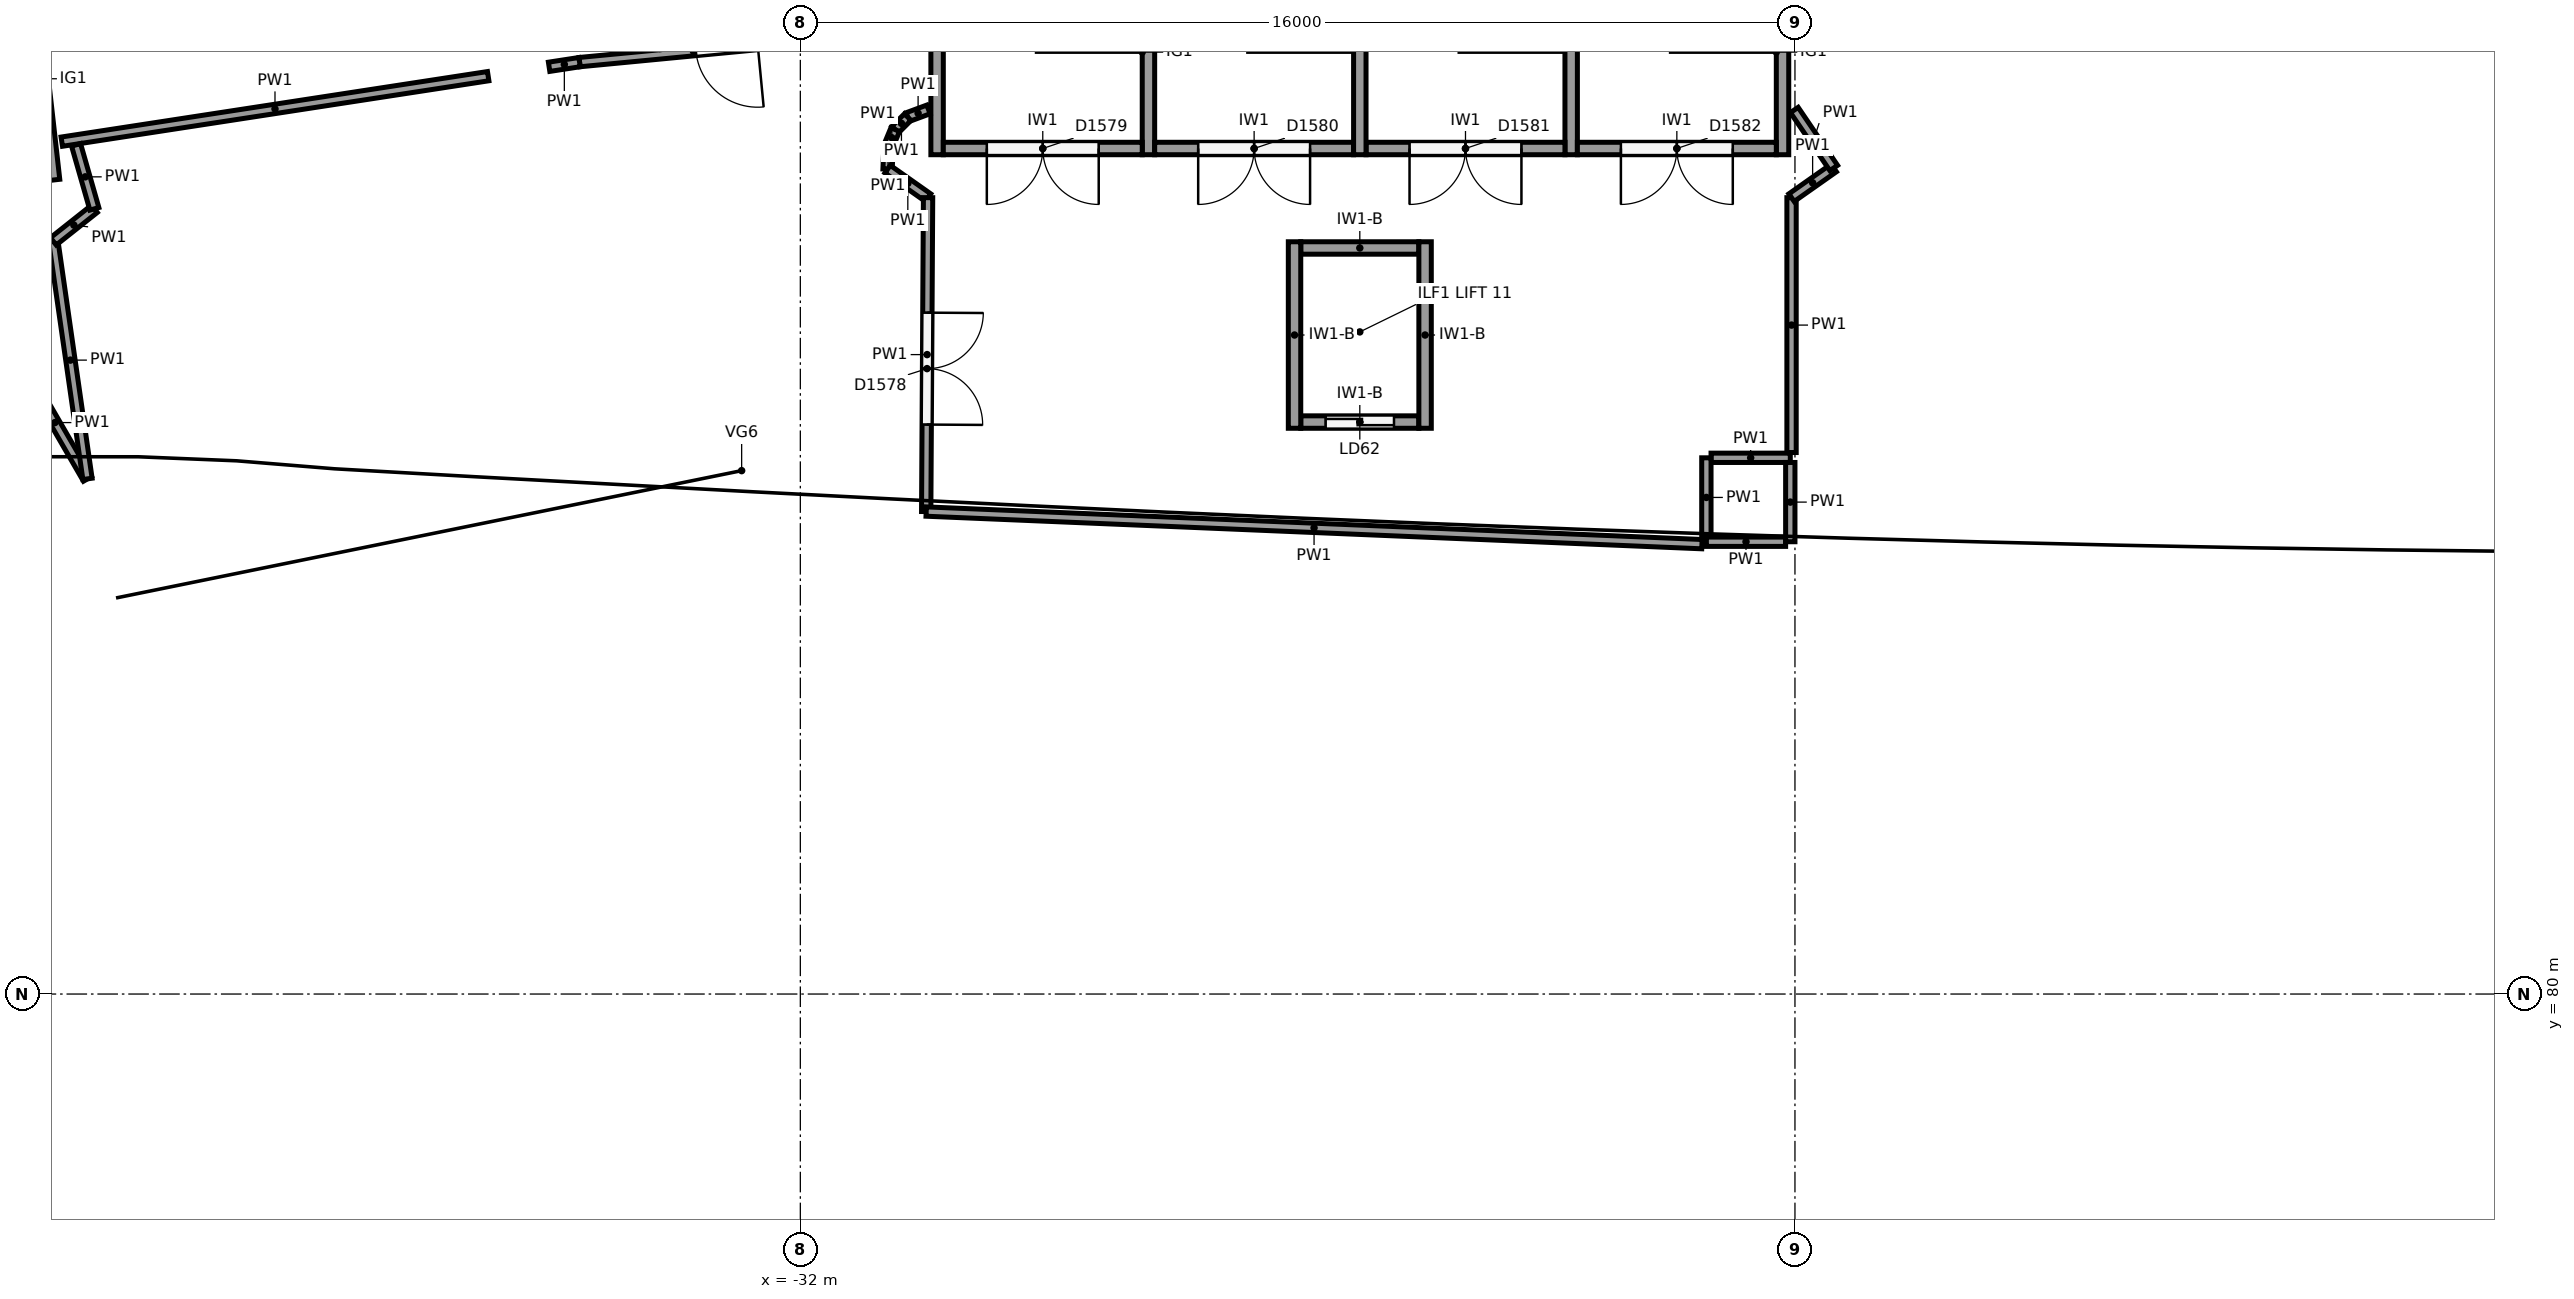
"""IFC4 building model, lengths in metres.
Left out: names, types, materials, properties, quantities, classifications, styles, units other than length and angle.
Written with IfcOpenShell. Run it as: python <this file> out.ifc"""

import sys

from ifc_helpers import new_model, si_unit, direction, frame, frame_2d, origin, origin_2d, place, context, subcontext, project, spatial, rectangle, circle, extrude, element, fill, save


model = new_model("IFC4")
c1 = context("Model", 3, precision=1e-05, world=origin(), true_north=direction((0.0, 1.0)))
c2 = subcontext(c1, "Body", "Model", "MODEL_VIEW")
j1 = project(units=[si_unit("LENGTHUNIT", "METRE"), si_unit("PLANEANGLEUNIT", "RADIAN")], contexts=[c1])
p1 = place(None, origin())
s1 = spatial("IfcSite", under=j1, at=p1, CompositionType="ELEMENT")
p2 = place(p1, origin())
s2 = spatial("IfcBuilding", under=s1, at=p2, CompositionType="ELEMENT")
p3 = place(p2, frame((0.0, 0.0, 24.0)))
s3 = spatial("IfcBuildingStorey", under=s2, at=p3, CompositionType="ELEMENT", Elevation=24.0)
p4 = place(p3, frame((-6.871, 89.518, 0.0), z_axis=(0.0, 0.0, 1.0), x_axis=(1.0, 0.0, 0.0)))
e1 = element("IfcColumn", 1, at=p4, inside=s3, PredefinedType="COLUMN", context=c2, shape_type="SweptSolid", body=[
    extrude(circle(Radius=0.45, at=origin_2d()), origin(), (0.0, 0.0, 1.0), 4.8),
])
p5 = place(p3, frame((-19.627, 89.904, 0.0), z_axis=(0.0, 0.0, 1.0), x_axis=(1.0, 0.0, 0.0)))
e2 = element("IfcColumn", 2, at=p5, inside=s3, PredefinedType="COLUMN", context=c2, shape_type="SweptSolid", body=[
    extrude(circle(Radius=0.55, at=origin_2d()), origin(), (0.0, 0.0, 1.0), 6.0),
])
p6 = place(p3, frame((-34.531, 89.912, 0.0), z_axis=(0.0, 0.0, 1.0), x_axis=(1.0, 0.0, 0.0)))
e3 = element("IfcColumn", 3, at=p6, inside=s3, PredefinedType="COLUMN", context=c2, shape_type="SweptSolid", body=[
    extrude(circle(Radius=0.45, at=origin_2d()), origin(), (0.0, 0.0, 1.0), 3.9),
])
for number, where, z_axis, x_axis in (
    (4, (-16.2, 102.3, 0.0), (0.0, 0.0, 1.0), (0.0, -1.0, 0.0)),
    (5, (-23.0, 102.3, 0.0), (0.0, 0.0, 1.0), (0.0, -1.0, 0.0)),
    (6, (-29.8, 102.3, 0.0), (0.0, 0.0, 1.0), (0.0, -1.0, 0.0)),
    (7, (-19.6, 102.3, 0.0), (0.0, 0.0, 1.0), (0.0, -1.0, 0.0)),
    (8, (-26.4, 102.3, 0.0), (0.0, 0.0, 1.0), (0.0, -1.0, 0.0)),
):
    element("IfcWall", number, at=place(p3, frame(where, z_axis=z_axis, x_axis=x_axis)), inside=s3, PredefinedType="SHEAR", context=c2, shape_type="SweptSolid", body=[
        extrude(rectangle(XDim=8.8, YDim=0.2, at=frame_2d((4.4, 0.0))), origin(), (0.0, 0.0, 1.0), 5.75),
    ])
p7 = place(p3, frame((-16.3, 93.6, 0.0), z_axis=(0.0, 0.0, 1.0), x_axis=(-1.0, 0.0, 0.0)))
e9 = element("IfcWall", 9, at=p7, inside=s3, PredefinedType="SHEAR", context=c2, shape_type="SweptSolid", body=[
    extrude(rectangle(XDim=3.2, YDim=0.2, at=frame_2d((1.6, 0.0))), origin(), (0.0, 0.0, 1.0), 5.75),
])
p8 = place(p7, frame((0.7, 0.0, 0.0)))
e10 = element("IfcOpeningElement", 10, at=p8, cuts=e9, PredefinedType="OPENING", context=c2, shape_type="SweptSolid", body=[
    extrude(rectangle(XDim=1.8, YDim=2.1, at=frame_2d((0.9, 1.05))), frame((0.0, 0.11, 0.0), z_axis=(0.0, -1.0, 0.0), x_axis=(1.0, 0.0, 0.0)), (0.0, 0.0, 1.0), 0.22),
])
p9 = place(p3, frame((-19.7, 93.6, 0.0), z_axis=(0.0, 0.0, 1.0), x_axis=(-1.0, 0.0, 0.0)))
e11 = element("IfcWall", 11, at=p9, inside=s3, PredefinedType="SHEAR", context=c2, shape_type="SweptSolid", body=[
    extrude(rectangle(XDim=3.2, YDim=0.2, at=frame_2d((1.6, 0.0))), origin(), (0.0, 0.0, 1.0), 5.75),
])
p10 = place(p9, frame((0.7, 0.0, 0.0)))
e12 = element("IfcOpeningElement", 12, at=p10, cuts=e11, PredefinedType="OPENING", context=c2, shape_type="SweptSolid", body=[
    extrude(rectangle(XDim=1.8, YDim=2.1, at=frame_2d((0.9, 1.05))), frame((0.0, 0.11, 0.0), z_axis=(0.0, -1.0, 0.0), x_axis=(1.0, 0.0, 0.0)), (0.0, 0.0, 1.0), 0.22),
])
p11 = place(p3, frame((-23.1, 93.6, 0.0), z_axis=(0.0, 0.0, 1.0), x_axis=(-1.0, 0.0, 0.0)))
e13 = element("IfcWall", 13, at=p11, inside=s3, PredefinedType="SHEAR", context=c2, shape_type="SweptSolid", body=[
    extrude(rectangle(XDim=3.2, YDim=0.2, at=frame_2d((1.6, 0.0))), origin(), (0.0, 0.0, 1.0), 5.75),
])
p12 = place(p11, frame((0.7, 0.0, 0.0)))
e14 = element("IfcOpeningElement", 14, at=p12, cuts=e13, PredefinedType="OPENING", context=c2, shape_type="SweptSolid", body=[
    extrude(rectangle(XDim=1.8, YDim=2.1, at=frame_2d((0.9, 1.05))), frame((0.0, 0.11, 0.0), z_axis=(0.0, -1.0, 0.0), x_axis=(1.0, 0.0, 0.0)), (0.0, 0.0, 1.0), 0.22),
])
p13 = place(p3, frame((-26.5, 93.6, 0.0), z_axis=(0.0, 0.0, 1.0), x_axis=(-1.0, 0.0, 0.0)))
e15 = element("IfcWall", 15, at=p13, inside=s3, PredefinedType="SHEAR", context=c2, shape_type="SweptSolid", body=[
    extrude(rectangle(XDim=3.2, YDim=0.2, at=frame_2d((1.6, 0.0))), origin(), (0.0, 0.0, 1.0), 5.75),
])
p14 = place(p13, frame((0.7, 0.0, 0.0)))
e16 = element("IfcOpeningElement", 16, at=p14, cuts=e15, PredefinedType="OPENING", context=c2, shape_type="SweptSolid", body=[
    extrude(rectangle(XDim=1.8, YDim=2.1, at=frame_2d((0.9, 1.05))), frame((0.0, 0.11, 0.0), z_axis=(0.0, -1.0, 0.0), x_axis=(1.0, 0.0, 0.0)), (0.0, 0.0, 1.0), 0.22),
])
for number, where, z_axis, x_axis in (
    (17, (-21.95, 92.1, 0.0), (0.0, 0.0, 1.0), (0.0, -1.0, 0.0)),
    (18, (-24.05, 92.1, 0.0), (0.0, 0.0, 1.0), (0.0, -1.0, 0.0)),
):
    element("IfcWall", number, at=place(p3, frame(where, z_axis=z_axis, x_axis=x_axis)), inside=s3, PredefinedType="SHEAR", context=c2, shape_type="SweptSolid", body=[
        extrude(rectangle(XDim=3.0, YDim=0.2, at=frame_2d((1.5, 0.0))), origin(), (0.0, 0.0, 1.0), 4.6),
    ])
p15 = place(p3, frame((-22.05, 92.0, 0.0), z_axis=(0.0, 0.0, 1.0), x_axis=(-1.0, 0.0, 0.0)))
e19 = element("IfcWall", 19, at=p15, inside=s3, PredefinedType="SHEAR", context=c2, shape_type="SweptSolid", body=[
    extrude(rectangle(XDim=1.9, YDim=0.2, at=frame_2d((0.95, 0.0))), origin(), (0.0, 0.0, 1.0), 4.6),
])
p16 = place(p3, frame((-22.05, 89.2, 0.0), z_axis=(0.0, 0.0, 1.0), x_axis=(-1.0, 0.0, 0.0)))
e20 = element("IfcWall", 20, at=p16, inside=s3, PredefinedType="SHEAR", context=c2, shape_type="SweptSolid", body=[
    extrude(rectangle(XDim=1.9, YDim=0.2, at=frame_2d((0.95, 0.0))), origin(), (0.0, 0.0, 1.0), 4.6),
])
p17 = place(p16, frame((0.4, 0.0, 0.0)))
e21 = element("IfcOpeningElement", 21, at=p17, cuts=e20, PredefinedType="OPENING", context=c2, shape_type="SweptSolid", body=[
    extrude(rectangle(XDim=1.1, YDim=2.1, at=frame_2d((0.55, 1.05))), frame((0.0, 0.11, 0.0), z_axis=(0.0, -1.0, 0.0), x_axis=(1.0, 0.0, 0.0)), (0.0, 0.0, 1.0), 0.22),
])
p18 = place(p3, frame((-44.863, 100.646, 0.0), z_axis=(0.0, 0.0, 1.0), x_axis=(0.111951003472, -0.993713727802, 0.0)))
e22 = element("IfcWall", 22, at=p18, inside=s3, PredefinedType="SHEAR", context=c2, shape_type="SweptSolid", body=[
    extrude(rectangle(XDim=7.6, YDim=0.2, at=frame_2d((3.8, 0.0))), origin(), (0.0, 0.0, 1.0), 5.75),
])
p19 = place(p3, frame((-31.889, 95.34, 0.0), z_axis=(0.0, 0.0, 1.0), x_axis=(-0.995436828667, -0.095422849118, 0.0)))
e23 = element("IfcWall", 23, at=p19, inside=s3, PredefinedType="PARTITIONING", context=c2, shape_type="SweptSolid", body=[
    extrude(rectangle(XDim=3.679, YDim=0.15, at=frame_2d((1.84, 0.0))), origin(), (0.0, 0.0, 1.0), 5.4),
])
p20 = place(p19, frame((0.8, 0.0, 0.0)))
e24 = element("IfcOpeningElement", 24, at=p20, cuts=e23, PredefinedType="OPENING", context=c2, shape_type="SweptSolid", body=[
    extrude(rectangle(XDim=1.0, YDim=2.1, at=frame_2d((0.5, 1.05))), frame((0.0, 0.085, 0.0), z_axis=(0.0, -1.0, 0.0), x_axis=(1.0, 0.0, 0.0)), (0.0, 0.0, 1.0), 0.17),
])
p21 = place(p3, frame((-35.551, 94.989, 0.0), z_axis=(0.0, 0.0, 1.0), x_axis=(-0.988428563691, -0.151687093979, 0.0)))
e25 = element("IfcWall", 25, at=p21, inside=s3, PredefinedType="PARTITIONING", context=c2, shape_type="SweptSolid", body=[
    extrude(rectangle(XDim=0.496, YDim=0.15, at=frame_2d((0.248, 0.0))), origin(), (0.0, 0.0, 1.0), 5.4),
])
p22 = place(p3, frame((-37.021, 94.763, 0.0), z_axis=(0.0, 0.0, 1.0), x_axis=(-0.988411114545, -0.151800753106, 0.0)))
e26 = element("IfcWall", 26, at=p22, inside=s3, PredefinedType="PARTITIONING", context=c2, shape_type="SweptSolid", body=[
    extrude(rectangle(XDim=6.94, YDim=0.15, at=frame_2d((3.47, 0.0))), origin(), (0.0, 0.0, 1.0), 5.4),
])
p23 = place(p3, frame((-16.075, 88.625, 0.0), z_axis=(0.0, 0.0, 1.0), x_axis=(-1.0, 0.0, 0.0)))
e27 = element("IfcWall", 27, at=p23, inside=s3, PredefinedType="PARTITIONING", context=c2, shape_type="SweptSolid", body=[
    extrude(rectangle(XDim=1.275, YDim=0.15, at=frame_2d((0.638, 0.0))), origin(), (0.0, 0.0, 1.0), 5.4),
])
p24 = place(p3, frame((-17.425, 88.625, 0.0), z_axis=(0.0, 0.0, 1.0), x_axis=(0.0, -1.0, 0.0)))
e28 = element("IfcWall", 28, at=p24, inside=s3, PredefinedType="PARTITIONING", context=c2, shape_type="SweptSolid", body=[
    extrude(rectangle(XDim=1.275, YDim=0.15, at=frame_2d((0.637, 0.0))), origin(), (0.0, 0.0, 1.0), 5.4),
])
for number, where, z_axis, x_axis in (
    (29, (-17.425, 87.275, 0.0), (0.0, 0.0, 1.0), (1.0, 0.0, 0.0)),
    (30, (-16.075, 87.275, 0.0), (0.0, 0.0, 1.0), (0.0, 1.0, 0.0)),
):
    element("IfcWall", number, at=place(p3, frame(where, z_axis=z_axis, x_axis=x_axis)), inside=s3, PredefinedType="PARTITIONING", context=c2, shape_type="SweptSolid", body=[
        extrude(rectangle(XDim=1.275, YDim=0.15, at=frame_2d((0.638, 0.0))), origin(), (0.0, 0.0, 1.0), 5.4),
    ])
p25 = place(p3, frame((-29.938, 94.229, 0.0), z_axis=(0.0, 0.0, 1.0), x_axis=(-0.937674325327, -0.347515265308, 0.0)))
e31 = element("IfcWall", 31, at=p25, inside=s3, PredefinedType="PARTITIONING", context=c2, shape_type="SweptSolid", body=[
    extrude(rectangle(XDim=0.356, YDim=0.15, at=frame_2d((0.178, 0.0))), origin(), (0.0, 0.0, 1.0), 5.4),
])
p26 = place(p3, frame((-30.272, 94.105, 0.0), z_axis=(0.0, 0.0, 1.0), x_axis=(-0.707534941396, -0.706678361564, 0.0)))
e32 = element("IfcWall", 32, at=p26, inside=s3, PredefinedType="PARTITIONING", context=c2, shape_type="SweptSolid", body=[
    extrude(rectangle(XDim=0.285, YDim=0.15, at=frame_2d((0.143, 0.0))), origin(), (0.0, 0.0, 1.0), 5.4),
])
p27 = place(p3, frame((-30.474, 93.904, 0.0), z_axis=(0.0, 0.0, 1.0), x_axis=(-0.382275228123, -0.924048510611, 0.0)))
e33 = element("IfcWall", 33, at=p27, inside=s3, PredefinedType="PARTITIONING", context=c2, shape_type="SweptSolid", body=[
    extrude(rectangle(XDim=0.282, YDim=0.15, at=frame_2d((0.141, 0.0))), origin(), (0.0, 0.0, 1.0), 5.4),
])
p28 = place(p3, frame((-30.582, 93.643, 0.0), z_axis=(0.0, 0.0, 1.0), x_axis=(-0.038982051143, -0.999239910977, 0.0)))
e34 = element("IfcWall", 34, at=p28, inside=s3, PredefinedType="PARTITIONING", context=c2, shape_type="SweptSolid", body=[
    extrude(rectangle(XDim=0.376, YDim=0.15, at=frame_2d((0.188, 0.0))), origin(), (0.0, 0.0, 1.0), 5.4),
])
p29 = place(p3, frame((-30.596, 93.268, 0.0), z_axis=(0.0, 0.0, 1.0), x_axis=(0.817630031149, -0.575743981439, 0.0)))
e35 = element("IfcWall", 35, at=p29, inside=s3, PredefinedType="PARTITIONING", context=c2, shape_type="SweptSolid", body=[
    extrude(rectangle(XDim=0.796, YDim=0.15, at=frame_2d((0.398, 0.0))), origin(), (0.0, 0.0, 1.0), 5.4),
])
p30 = place(p3, frame((-29.945, 92.809, 0.0), z_axis=(0.0, 0.0, 1.0), x_axis=(-0.005947670427, -0.999982312452, 0.0)))
e36 = element("IfcWall", 36, at=p30, inside=s3, PredefinedType="PARTITIONING", context=c2, shape_type="SweptSolid", body=[
    extrude(rectangle(XDim=5.049, YDim=0.15, at=frame_2d((2.524, 0.0))), origin(), (0.0, 0.0, 1.0), 5.4),
])
p31 = place(p30, frame((1.85, 0.0, 0.0)))
e37 = element("IfcOpeningElement", 37, at=p31, cuts=e36, PredefinedType="OPENING", context=c2, shape_type="SweptSolid", body=[
    extrude(rectangle(XDim=1.8, YDim=2.1, at=frame_2d((0.9, 1.05))), frame((0.0, 0.085, 0.0), z_axis=(0.0, -1.0, 0.0), x_axis=(1.0, 0.0, 0.0)), (0.0, 0.0, 1.0), 0.17),
])
p32 = place(p3, frame((-29.975, 87.76, 0.0), z_axis=(0.0, 0.0, 1.0), x_axis=(0.999118137172, -0.041987474002, 0.0)))
e38 = element("IfcWall", 38, at=p32, inside=s3, PredefinedType="PARTITIONING", context=c2, shape_type="SweptSolid", body=[
    extrude(rectangle(XDim=12.49, YDim=0.15, at=frame_2d((6.245, 0.0))), origin(), (0.0, 0.0, 1.0), 5.4),
])
p33 = place(p3, frame((-16.055, 88.71, 0.0), z_axis=(0.0, 0.0, 1.0), x_axis=(0.0, 1.0, 0.0)))
e39 = element("IfcWall", 39, at=p33, inside=s3, PredefinedType="PARTITIONING", context=c2, shape_type="SweptSolid", body=[
    extrude(rectangle(XDim=4.099, YDim=0.15, at=frame_2d((2.05, 0.0))), origin(), (0.0, 0.0, 1.0), 5.4),
])
p34 = place(p3, frame((-16.055, 92.809, 0.0), z_axis=(0.0, 0.0, 1.0), x_axis=(0.81774999294, 0.575573582652, 0.0)))
e40 = element("IfcWall", 40, at=p34, inside=s3, PredefinedType="PARTITIONING", context=c2, shape_type="SweptSolid", body=[
    extrude(rectangle(XDim=0.83, YDim=0.15, at=frame_2d((0.415, 0.0))), origin(), (0.0, 0.0, 1.0), 5.4),
])
p35 = place(p3, frame((-15.376, 93.287, 0.0), z_axis=(0.0, 0.0, 1.0), x_axis=(-0.562120553728, 0.827055308354, 0.0)))
e41 = element("IfcWall", 41, at=p35, inside=s3, PredefinedType="PARTITIONING", context=c2, shape_type="SweptSolid", body=[
    extrude(rectangle(XDim=1.128, YDim=0.15, at=frame_2d((0.564, 0.0))), origin(), (0.0, 0.0, 1.0), 5.4),
])
p36 = place(p3, frame((-44.516, 90.097, 0.0), z_axis=(0.0, 0.0, 1.0), x_axis=(0.501068461494, -0.865407647815, 0.0)))
e42 = element("IfcWall", 42, at=p36, inside=s3, PredefinedType="PARTITIONING", context=c2, shape_type="SweptSolid", body=[
    extrude(rectangle(XDim=2.093, YDim=0.15, at=frame_2d((1.046, 0.0))), origin(), (0.0, 0.0, 1.0), 5.4),
])
p37 = place(p3, frame((-43.467, 88.286, 0.0), z_axis=(0.0, 0.0, 1.0), x_axis=(-0.14226260917, 0.989828949886, 0.0)))
e43 = element("IfcWall", 43, at=p37, inside=s3, PredefinedType="PARTITIONING", context=c2, shape_type="SweptSolid", body=[
    extrude(rectangle(XDim=3.86, YDim=0.15, at=frame_2d((1.93, 0.0))), origin(), (0.0, 0.0, 1.0), 5.4),
])
p38 = place(p3, frame((-44.016, 92.106, 0.0), z_axis=(0.0, 0.0, 1.0), x_axis=(0.783745876513, 0.621081637991, 0.0)))
e44 = element("IfcWall", 44, at=p38, inside=s3, PredefinedType="PARTITIONING", context=c2, shape_type="SweptSolid", body=[
    extrude(rectangle(XDim=0.842, YDim=0.15, at=frame_2d((0.421, 0.0))), origin(), (0.0, 0.0, 1.0), 5.4),
])
p39 = place(p3, frame((-43.356, 92.629, 0.0), z_axis=(0.0, 0.0, 1.0), x_axis=(-0.27523308246, 0.961377527467, 0.0)))
e45 = element("IfcWall", 45, at=p39, inside=s3, PredefinedType="PARTITIONING", context=c2, shape_type="SweptSolid", body=[
    extrude(rectangle(XDim=1.071, YDim=0.15, at=frame_2d((0.535, 0.0))), origin(), (0.0, 0.0, 1.0), 5.4),
])
p40 = place(p8, origin())
e46 = element("IfcDoor", 46, at=p40, inside=s3, OperationType="DOUBLE_DOOR_SINGLE_SWING", PredefinedType="DOOR", context=c2, shape_type="SweptSolid", body=[
    extrude(rectangle(XDim=1.8, YDim=2.1, at=frame_2d((0.9, 1.05))), frame((0.0, 0.025, 0.0), z_axis=(0.0, -1.0, 0.0), x_axis=(1.0, 0.0, 0.0)), (0.0, 0.0, 1.0), 0.05),
])
fill(e10, e46)
p41 = place(p10, origin())
e47 = element("IfcDoor", 47, at=p41, inside=s3, OperationType="DOUBLE_DOOR_SINGLE_SWING", PredefinedType="DOOR", context=c2, shape_type="SweptSolid", body=[
    extrude(rectangle(XDim=1.8, YDim=2.1, at=frame_2d((0.9, 1.05))), frame((0.0, 0.025, 0.0), z_axis=(0.0, -1.0, 0.0), x_axis=(1.0, 0.0, 0.0)), (0.0, 0.0, 1.0), 0.05),
])
fill(e12, e47)
p42 = place(p12, origin())
e48 = element("IfcDoor", 48, at=p42, inside=s3, OperationType="DOUBLE_DOOR_SINGLE_SWING", PredefinedType="DOOR", context=c2, shape_type="SweptSolid", body=[
    extrude(rectangle(XDim=1.8, YDim=2.1, at=frame_2d((0.9, 1.05))), frame((0.0, 0.025, 0.0), z_axis=(0.0, -1.0, 0.0), x_axis=(1.0, 0.0, 0.0)), (0.0, 0.0, 1.0), 0.05),
])
fill(e14, e48)
p43 = place(p14, origin())
e49 = element("IfcDoor", 49, at=p43, inside=s3, OperationType="DOUBLE_DOOR_SINGLE_SWING", PredefinedType="DOOR", context=c2, shape_type="SweptSolid", body=[
    extrude(rectangle(XDim=1.8, YDim=2.1, at=frame_2d((0.9, 1.05))), frame((0.0, 0.025, 0.0), z_axis=(0.0, -1.0, 0.0), x_axis=(1.0, 0.0, 0.0)), (0.0, 0.0, 1.0), 0.05),
])
fill(e16, e49)
p44 = place(p17, origin())
e50 = element("IfcDoor", 50, at=p44, inside=s3, OperationType="SLIDING_TO_RIGHT", PredefinedType="DOOR", context=c2, shape_type="SweptSolid", body=[
    extrude(rectangle(XDim=1.1, YDim=2.1, at=frame_2d((0.55, 1.05))), frame((0.0, 0.025, 0.0), z_axis=(0.0, -1.0, 0.0), x_axis=(1.0, 0.0, 0.0)), (0.0, 0.0, 1.0), 0.05),
])
fill(e21, e50)
p45 = place(p20, origin())
e51 = element("IfcDoor", 51, at=p45, inside=s3, OperationType="SINGLE_SWING_LEFT", PredefinedType="DOOR", context=c2, shape_type="SweptSolid", body=[
    extrude(rectangle(XDim=1.0, YDim=2.1, at=frame_2d((0.5, 1.05))), frame((0.0, 0.025, 0.0), z_axis=(0.0, -1.0, 0.0), x_axis=(1.0, 0.0, 0.0)), (0.0, 0.0, 1.0), 0.05),
])
fill(e24, e51)
p46 = place(p31, origin())
e52 = element("IfcDoor", 52, at=p46, inside=s3, OperationType="DOUBLE_DOOR_SINGLE_SWING", PredefinedType="DOOR", context=c2, shape_type="SweptSolid", body=[
    extrude(rectangle(XDim=1.8, YDim=2.1, at=frame_2d((0.9, 1.05))), frame((0.0, 0.025, 0.0), z_axis=(0.0, -1.0, 0.0), x_axis=(1.0, 0.0, 0.0)), (0.0, 0.0, 1.0), 0.05),
])
fill(e37, e52)
save(model, sys.argv[1])
